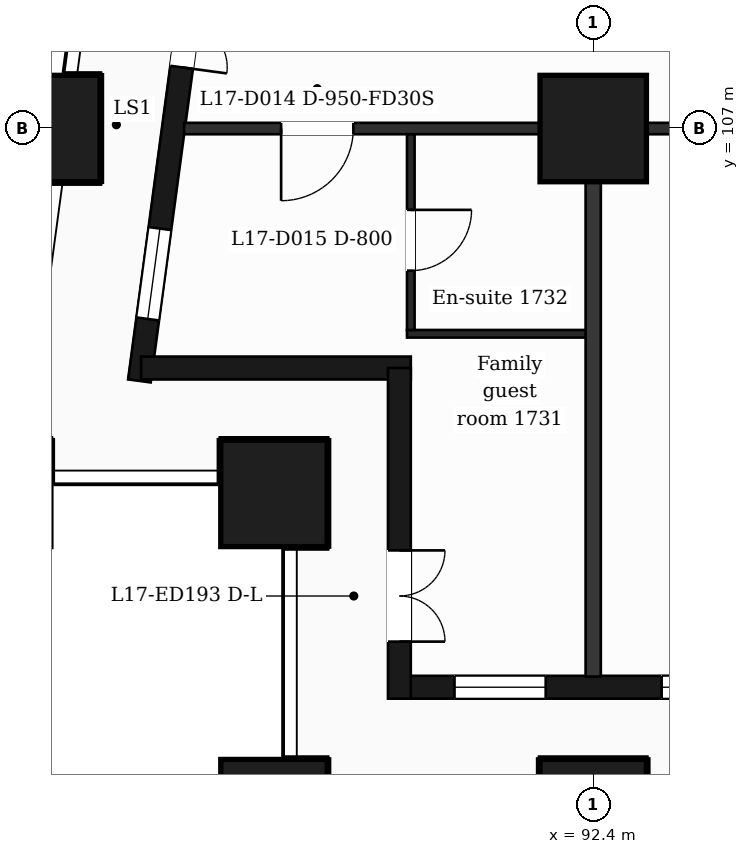
"""IFC4 building model, lengths in metres.
Left out: names, types, materials, properties, quantities, classifications, styles, units other than length and angle.
Written with IfcOpenShell. Run it as: python <this file> out.ifc"""

import sys

from ifc_helpers import new_model, si_unit, direction, frame, frame_2d, origin, origin_2d, place, context, subcontext, project, spatial, rectangle, extrude, element, fill, save


model = new_model("IFC4")
c1 = context("Model", 3, precision=1e-05, world=origin(), true_north=direction((0.0, 1.0)))
c2 = subcontext(c1, "Body", "Model", "MODEL_VIEW")
j1 = project(units=[si_unit("LENGTHUNIT", "METRE"), si_unit("PLANEANGLEUNIT", "RADIAN")], contexts=[c1])
p1 = place(None, origin())
s1 = spatial("IfcSite", under=j1, at=p1, CompositionType="ELEMENT")
p2 = place(p1, origin())
s2 = spatial("IfcBuilding", under=s1, at=p2, CompositionType="ELEMENT")
p3 = place(p2, frame((0.0, 0.0, 77.5)))
s3 = spatial("IfcBuildingStorey", under=s2, at=p3, CompositionType="ELEMENT", Elevation=77.5)
for number, where, z_axis, x_axis in (
    (1, (92.4, 98.0, 0.0), (0.0, 0.0, 1.0), (1.0, 0.0, 0.0)),
    (2, (88.2, 98.0, 0.0), (0.0, 0.0, 1.0), (1.0, 0.0, 0.0)),
    (3, (88.2, 102.2, 0.0), (0.0, 0.0, 1.0), (1.0, 0.0, 0.0)),
    (4, (92.4, 107.0, 0.0), (0.0, 0.0, 1.0), (1.0, 0.0, 0.0)),
    (5, (85.211, 107.0, 0.0), (0.0, 0.0, 1.0), (1.0, 0.0, 0.0)),
):
    element("IfcColumn", number, at=place(p3, frame(where, z_axis=z_axis, x_axis=x_axis)), inside=s3, PredefinedType="COLUMN", context=c2, shape_type="SweptSolid", body=[
        extrude(rectangle(XDim=1.4, YDim=1.4, at=origin_2d()), origin(), (0.0, 0.0, 1.0), 3.5),
    ])
p4 = place(p3, frame((89.85, 99.65, 0.0), z_axis=(0.0, 0.0, 1.0), x_axis=(1.0, 0.0, 0.0)))
e6 = element("IfcWall", 6, at=p4, inside=s3, PredefinedType="SOLIDWALL", context=c2, shape_type="SweptSolid", body=[
    extrude(rectangle(XDim=47.25, YDim=0.3, at=frame_2d((23.625, 0.0))), origin(), (0.0, 0.0, 1.0), 3.0),
])
p5 = place(p4, frame((0.725, 0.0, 0.9)))
e7 = element("IfcOpeningElement", 7, at=p5, cuts=e6, PredefinedType="OPENING", context=c2, shape_type="SweptSolid", body=[
    extrude(rectangle(XDim=1.2, YDim=2.1, at=frame_2d((0.6, 1.05))), frame((0.0, 0.16, 0.0), z_axis=(0.0, -1.0, 0.0), x_axis=(1.0, 0.0, 0.0)), (0.0, 0.0, 1.0), 0.32),
])
p6 = place(p4, frame((3.45, 0.0, 0.9)))
e8 = element("IfcOpeningElement", 8, at=p6, cuts=e6, PredefinedType="OPENING", context=c2, shape_type="SweptSolid", body=[
    extrude(rectangle(XDim=2.4, YDim=2.1, at=frame_2d((1.2, 1.05))), frame((0.0, 0.16, 0.0), z_axis=(0.0, -1.0, 0.0), x_axis=(1.0, 0.0, 0.0)), (0.0, 0.0, 1.0), 0.32),
])
p7 = place(p4, frame((7.65, 0.0, 0.9)))
e9 = element("IfcOpeningElement", 9, at=p7, cuts=e6, PredefinedType="OPENING", context=c2, shape_type="SweptSolid", body=[
    extrude(rectangle(XDim=2.4, YDim=2.1, at=frame_2d((1.2, 1.05))), frame((0.0, 0.16, 0.0), z_axis=(0.0, -1.0, 0.0), x_axis=(1.0, 0.0, 0.0)), (0.0, 0.0, 1.0), 0.32),
])
p8 = place(p4, frame((11.85, 0.0, 0.9)))
e10 = element("IfcOpeningElement", 10, at=p8, cuts=e6, PredefinedType="OPENING", context=c2, shape_type="SweptSolid", body=[
    extrude(rectangle(XDim=2.4, YDim=2.1, at=frame_2d((1.2, 1.05))), frame((0.0, 0.16, 0.0), z_axis=(0.0, -1.0, 0.0), x_axis=(1.0, 0.0, 0.0)), (0.0, 0.0, 1.0), 0.32),
])
p9 = place(p4, frame((16.05, 0.0, 0.9)))
e11 = element("IfcOpeningElement", 11, at=p9, cuts=e6, PredefinedType="OPENING", context=c2, shape_type="SweptSolid", body=[
    extrude(rectangle(XDim=2.4, YDim=2.1, at=frame_2d((1.2, 1.05))), frame((0.0, 0.16, 0.0), z_axis=(0.0, -1.0, 0.0), x_axis=(1.0, 0.0, 0.0)), (0.0, 0.0, 1.0), 0.32),
])
p10 = place(p4, frame((20.25, 0.0, 0.9)))
e12 = element("IfcOpeningElement", 12, at=p10, cuts=e6, PredefinedType="OPENING", context=c2, shape_type="SweptSolid", body=[
    extrude(rectangle(XDim=2.4, YDim=2.1, at=frame_2d((1.2, 1.05))), frame((0.0, 0.16, 0.0), z_axis=(0.0, -1.0, 0.0), x_axis=(1.0, 0.0, 0.0)), (0.0, 0.0, 1.0), 0.32),
])
p11 = place(p4, frame((25.05, 0.0, 0.9)))
e13 = element("IfcOpeningElement", 13, at=p11, cuts=e6, PredefinedType="OPENING", context=c2, shape_type="SweptSolid", body=[
    extrude(rectangle(XDim=1.2, YDim=2.1, at=frame_2d((0.6, 1.05))), frame((0.0, 0.16, 0.0), z_axis=(0.0, -1.0, 0.0), x_axis=(1.0, 0.0, 0.0)), (0.0, 0.0, 1.0), 0.32),
])
p12 = place(p4, frame((29.25, 0.0, 0.9)))
e14 = element("IfcOpeningElement", 14, at=p12, cuts=e6, PredefinedType="OPENING", context=c2, shape_type="SweptSolid", body=[
    extrude(rectangle(XDim=1.2, YDim=2.1, at=frame_2d((0.6, 1.05))), frame((0.0, 0.16, 0.0), z_axis=(0.0, -1.0, 0.0), x_axis=(1.0, 0.0, 0.0)), (0.0, 0.0, 1.0), 0.32),
])
p13 = place(p4, frame((32.55, 0.0, 0.0)))
e15 = element("IfcOpeningElement", 15, at=p13, cuts=e6, PredefinedType="OPENING", context=c2, shape_type="SweptSolid", body=[
    extrude(rectangle(XDim=1.2, YDim=2.4, at=frame_2d((0.6, 1.2))), frame((0.0, 0.16, 0.0), z_axis=(0.0, -1.0, 0.0), x_axis=(1.0, 0.0, 0.0)), (0.0, 0.0, 1.0), 0.32),
])
p14 = place(p4, frame((34.35, 0.0, 0.9)))
e16 = element("IfcOpeningElement", 16, at=p14, cuts=e6, PredefinedType="OPENING", context=c2, shape_type="SweptSolid", body=[
    extrude(rectangle(XDim=1.2, YDim=2.1, at=frame_2d((0.6, 1.05))), frame((0.0, 0.16, 0.0), z_axis=(0.0, -1.0, 0.0), x_axis=(1.0, 0.0, 0.0)), (0.0, 0.0, 1.0), 0.32),
])
p15 = place(p4, frame((37.05, 0.0, 0.9)))
e17 = element("IfcOpeningElement", 17, at=p15, cuts=e6, PredefinedType="OPENING", context=c2, shape_type="SweptSolid", body=[
    extrude(rectangle(XDim=2.4, YDim=2.1, at=frame_2d((1.2, 1.05))), frame((0.0, 0.16, 0.0), z_axis=(0.0, -1.0, 0.0), x_axis=(1.0, 0.0, 0.0)), (0.0, 0.0, 1.0), 0.32),
])
p16 = place(p4, frame((40.95, 0.0, 0.0)))
e18 = element("IfcOpeningElement", 18, at=p16, cuts=e6, PredefinedType="OPENING", context=c2, shape_type="SweptSolid", body=[
    extrude(rectangle(XDim=1.2, YDim=2.4, at=frame_2d((0.6, 1.2))), frame((0.0, 0.16, 0.0), z_axis=(0.0, -1.0, 0.0), x_axis=(1.0, 0.0, 0.0)), (0.0, 0.0, 1.0), 0.32),
])
p17 = place(p4, frame((42.75, 0.0, 0.9)))
e19 = element("IfcOpeningElement", 19, at=p17, cuts=e6, PredefinedType="OPENING", context=c2, shape_type="SweptSolid", body=[
    extrude(rectangle(XDim=1.2, YDim=2.1, at=frame_2d((0.6, 1.05))), frame((0.0, 0.16, 0.0), z_axis=(0.0, -1.0, 0.0), x_axis=(1.0, 0.0, 0.0)), (0.0, 0.0, 1.0), 0.32),
])
p18 = place(p4, frame((45.25, 0.0, 0.9)))
e20 = element("IfcOpeningElement", 20, at=p18, cuts=e6, PredefinedType="OPENING", context=c2, shape_type="SweptSolid", body=[
    extrude(rectangle(XDim=1.2, YDim=2.1, at=frame_2d((0.6, 1.05))), frame((0.0, 0.16, 0.0), z_axis=(0.0, -1.0, 0.0), x_axis=(1.0, 0.0, 0.0)), (0.0, 0.0, 1.0), 0.32),
])
p19 = place(p3, frame((87.334, 110.4, 0.0), z_axis=(0.0, 0.0, 1.0), x_axis=(-0.133437175554, -0.991057273915, 0.0)))
e21 = element("IfcWall", 21, at=p19, inside=s3, PredefinedType="SOLIDWALL", context=c2, shape_type="SweptSolid", body=[
    extrude(rectangle(XDim=6.781, YDim=0.3, at=frame_2d((3.39, 0.0))), origin(), (0.0, 0.0, 1.0), 3.0),
])
p20 = place(p19, frame((1.418, 0.0, 0.0)))
e22 = element("IfcOpeningElement", 22, at=p20, cuts=e21, PredefinedType="OPENING", context=c2, shape_type="SweptSolid", body=[
    extrude(rectangle(XDim=1.2, YDim=2.4, at=frame_2d((0.6, 1.2))), frame((0.0, 0.16, 0.0), z_axis=(0.0, -1.0, 0.0), x_axis=(1.0, 0.0, 0.0)), (0.0, 0.0, 1.0), 0.32),
])
p21 = place(p19, frame((4.758, 0.0, 0.9)))
e23 = element("IfcOpeningElement", 23, at=p21, cuts=e21, PredefinedType="OPENING", context=c2, shape_type="SweptSolid", body=[
    extrude(rectangle(XDim=1.2, YDim=2.1, at=frame_2d((0.6, 1.05))), frame((0.0, 0.16, 0.0), z_axis=(0.0, -1.0, 0.0), x_axis=(1.0, 0.0, 0.0)), (0.0, 0.0, 1.0), 0.32),
])
p22 = place(p3, frame((86.452, 103.85, 0.0), z_axis=(0.0, 0.0, 1.0), x_axis=(1.0, 0.0, 0.0)))
e24 = element("IfcWall", 24, at=p22, inside=s3, PredefinedType="SOLIDWALL", context=c2, shape_type="SweptSolid", body=[
    extrude(rectangle(XDim=3.548, YDim=0.3, at=frame_2d((1.774, 0.0))), origin(), (0.0, 0.0, 1.0), 3.0),
])
p23 = place(p3, frame((89.85, 103.85, 0.0), z_axis=(0.0, 0.0, 1.0), x_axis=(0.0, -1.0, 0.0)))
e25 = element("IfcWall", 25, at=p23, inside=s3, PredefinedType="SOLIDWALL", context=c2, shape_type="SweptSolid", body=[
    extrude(rectangle(XDim=4.35, YDim=0.3, at=frame_2d((2.175, 0.0))), origin(), (0.0, 0.0, 1.0), 3.0),
])
p24 = place(p23, frame((2.4, 0.0, 0.0)))
e26 = element("IfcOpeningElement", 26, at=p24, cuts=e25, PredefinedType="OPENING", context=c2, shape_type="SweptSolid", body=[
    extrude(rectangle(XDim=1.2, YDim=2.4, at=frame_2d((0.6, 1.2))), frame((0.0, 0.16, 0.0), z_axis=(0.0, -1.0, 0.0), x_axis=(1.0, 0.0, 0.0)), (0.0, 0.0, 1.0), 0.32),
])
p25 = place(p3, frame((89.95, 104.3, 0.0), z_axis=(0.0, 0.0, 1.0), x_axis=(1.0, 0.0, 0.0)))
e27 = element("IfcWall", 27, at=p25, inside=s3, PredefinedType="PARTITIONING", context=c2, shape_type="SweptSolid", body=[
    extrude(rectangle(XDim=2.45, YDim=0.1, at=frame_2d((1.225, 0.0))), origin(), (0.0, 0.0, 1.0), 3.0),
])
p26 = place(p3, frame((87.018, 107.0, 0.0), z_axis=(0.0, 0.0, 1.0), x_axis=(1.0, 0.0, 0.0)))
e28 = element("IfcWall", 28, at=p26, inside=s3, PredefinedType="PARTITIONING", context=c2, shape_type="SweptSolid", body=[
    extrude(rectangle(XDim=52.765, YDim=0.15, at=frame_2d((26.382, 0.0))), origin(), (0.0, 0.0, 1.0), 3.0),
])
p27 = place(p26, frame((1.276, 0.0, 0.0)))
e29 = element("IfcOpeningElement", 29, at=p27, cuts=e28, PredefinedType="OPENING", context=c2, shape_type="SweptSolid", body=[
    extrude(rectangle(XDim=0.95, YDim=2.1, at=frame_2d((0.475, 1.05))), frame((0.0, 0.085, 0.0), z_axis=(0.0, -1.0, 0.0), x_axis=(1.0, 0.0, 0.0)), (0.0, 0.0, 1.0), 0.17),
])
p28 = place(p26, frame((10.757, 0.0, 0.0)))
e30 = element("IfcOpeningElement", 30, at=p28, cuts=e28, PredefinedType="OPENING", context=c2, shape_type="SweptSolid", body=[
    extrude(rectangle(XDim=1.0, YDim=2.1, at=frame_2d((0.5, 1.05))), frame((0.0, 0.085, 0.0), z_axis=(0.0, -1.0, 0.0), x_axis=(1.0, 0.0, 0.0)), (0.0, 0.0, 1.0), 0.17),
])
p29 = place(p26, frame((23.125, 0.0, 0.0)))
e31 = element("IfcOpeningElement", 31, at=p29, cuts=e28, PredefinedType="OPENING", context=c2, shape_type="SweptSolid", body=[
    extrude(rectangle(XDim=0.95, YDim=2.1, at=frame_2d((0.475, 1.05))), frame((0.0, 0.085, 0.0), z_axis=(0.0, -1.0, 0.0), x_axis=(1.0, 0.0, 0.0)), (0.0, 0.0, 1.0), 0.17),
])
p30 = place(p26, frame((31.757, 0.0, 0.0)))
e32 = element("IfcOpeningElement", 32, at=p30, cuts=e28, PredefinedType="OPENING", context=c2, shape_type="SweptSolid", body=[
    extrude(rectangle(XDim=1.0, YDim=2.1, at=frame_2d((0.5, 1.05))), frame((0.0, 0.085, 0.0), z_axis=(0.0, -1.0, 0.0), x_axis=(1.0, 0.0, 0.0)), (0.0, 0.0, 1.0), 0.17),
])
p31 = place(p26, frame((42.819, 0.0, 0.0)))
e33 = element("IfcOpeningElement", 33, at=p31, cuts=e28, PredefinedType="OPENING", context=c2, shape_type="SweptSolid", body=[
    extrude(rectangle(XDim=0.95, YDim=2.1, at=frame_2d((0.475, 1.05))), frame((0.0, 0.085, 0.0), z_axis=(0.0, -1.0, 0.0), x_axis=(1.0, 0.0, 0.0)), (0.0, 0.0, 1.0), 0.17),
])
p32 = place(p26, frame((48.974, 0.0, 0.0)))
e34 = element("IfcOpeningElement", 34, at=p32, cuts=e28, PredefinedType="OPENING", context=c2, shape_type="SweptSolid", body=[
    extrude(rectangle(XDim=0.95, YDim=2.1, at=frame_2d((0.475, 1.05))), frame((0.0, 0.085, 0.0), z_axis=(0.0, -1.0, 0.0), x_axis=(1.0, 0.0, 0.0)), (0.0, 0.0, 1.0), 0.17),
])
p33 = place(p3, frame((90.0, 104.35, 0.0), z_axis=(0.0, 0.0, 1.0), x_axis=(0.0, 1.0, 0.0)))
e35 = element("IfcWall", 35, at=p33, inside=s3, PredefinedType="PARTITIONING", context=c2, shape_type="SweptSolid", body=[
    extrude(rectangle(XDim=2.575, YDim=0.1, at=frame_2d((1.288, 0.0))), origin(), (0.0, 0.0, 1.0), 3.0),
])
p34 = place(p33, frame((0.78, 0.0, 0.0)))
e36 = element("IfcOpeningElement", 36, at=p34, cuts=e35, PredefinedType="OPENING", context=c2, shape_type="SweptSolid", body=[
    extrude(rectangle(XDim=0.8, YDim=2.1, at=frame_2d((0.4, 1.05))), frame((0.0, 0.06, 0.0), z_axis=(0.0, -1.0, 0.0), x_axis=(1.0, 0.0, 0.0)), (0.0, 0.0, 1.0), 0.12),
])
p35 = place(p3, frame((92.4, 99.79, 0.0), z_axis=(0.0, 0.0, 1.0), x_axis=(0.0, 1.0, 0.0)))
e37 = element("IfcWall", 37, at=p35, inside=s3, PredefinedType="PARTITIONING", context=c2, shape_type="SweptSolid", body=[
    extrude(rectangle(XDim=7.135, YDim=0.2, at=frame_2d((3.567, 0.0))), origin(), (0.0, 0.0, 1.0), 3.0),
])
p36 = place(p5, origin())
e38 = element("IfcWindow", 38, at=p36, inside=s3, PartitioningType="SINGLE_PANEL", PredefinedType="WINDOW", context=c2, shape_type="SweptSolid", body=[
    extrude(rectangle(XDim=1.2, YDim=2.1, at=frame_2d((0.6, 1.05))), frame((0.0, 0.03, 0.0), z_axis=(0.0, -1.0, 0.0), x_axis=(1.0, 0.0, 0.0)), (0.0, 0.0, 1.0), 0.06),
])
fill(e7, e38)
p37 = place(p6, origin())
e39 = element("IfcWindow", 39, at=p37, inside=s3, PartitioningType="SINGLE_PANEL", PredefinedType="WINDOW", context=c2, shape_type="SweptSolid", body=[
    extrude(rectangle(XDim=2.4, YDim=2.1, at=frame_2d((1.2, 1.05))), frame((0.0, 0.03, 0.0), z_axis=(0.0, -1.0, 0.0), x_axis=(1.0, 0.0, 0.0)), (0.0, 0.0, 1.0), 0.06),
])
fill(e8, e39)
p38 = place(p20, origin())
e40 = element("IfcDoor", 40, at=p38, inside=s3, OperationType="DOUBLE_DOOR_SINGLE_SWING", PredefinedType="DOOR", context=c2, shape_type="SweptSolid", body=[
    extrude(rectangle(XDim=1.2, YDim=2.4, at=frame_2d((0.6, 1.2))), frame((0.0, 0.025, 0.0), z_axis=(0.0, -1.0, 0.0), x_axis=(1.0, 0.0, 0.0)), (0.0, 0.0, 1.0), 0.05),
])
fill(e22, e40)
p39 = place(p21, origin())
e41 = element("IfcWindow", 41, at=p39, inside=s3, PartitioningType="SINGLE_PANEL", PredefinedType="WINDOW", context=c2, shape_type="SweptSolid", body=[
    extrude(rectangle(XDim=1.2, YDim=2.1, at=frame_2d((0.6, 1.05))), frame((0.0, 0.03, 0.0), z_axis=(0.0, -1.0, 0.0), x_axis=(1.0, 0.0, 0.0)), (0.0, 0.0, 1.0), 0.06),
])
fill(e23, e41)
p40 = place(p24, origin())
e42 = element("IfcDoor", 42, at=p40, inside=s3, OperationType="DOUBLE_DOOR_SINGLE_SWING", PredefinedType="DOOR", context=c2, shape_type="SweptSolid", body=[
    extrude(rectangle(XDim=1.2, YDim=2.4, at=frame_2d((0.6, 1.2))), frame((0.0, 0.025, 0.0), z_axis=(0.0, -1.0, 0.0), x_axis=(1.0, 0.0, 0.0)), (0.0, 0.0, 1.0), 0.05),
])
fill(e26, e42)
p41 = place(p27, origin())
e43 = element("IfcDoor", 43, at=p41, inside=s3, OperationType="SINGLE_SWING_LEFT", PredefinedType="DOOR", context=c2, shape_type="SweptSolid", body=[
    extrude(rectangle(XDim=0.95, YDim=2.1, at=frame_2d((0.475, 1.05))), frame((0.0, 0.025, 0.0), z_axis=(0.0, -1.0, 0.0), x_axis=(1.0, 0.0, 0.0)), (0.0, 0.0, 1.0), 0.05),
])
fill(e29, e43)
p42 = place(p34, origin())
e44 = element("IfcDoor", 44, at=p42, inside=s3, OperationType="SINGLE_SWING_RIGHT", PredefinedType="DOOR", context=c2, shape_type="SweptSolid", body=[
    extrude(rectangle(XDim=0.8, YDim=2.1, at=frame_2d((0.4, 1.05))), frame((0.0, 0.025, 0.0), z_axis=(0.0, -1.0, 0.0), x_axis=(1.0, 0.0, 0.0)), (0.0, 0.0, 1.0), 0.05),
])
fill(e36, e44)
save(model, sys.argv[1])
